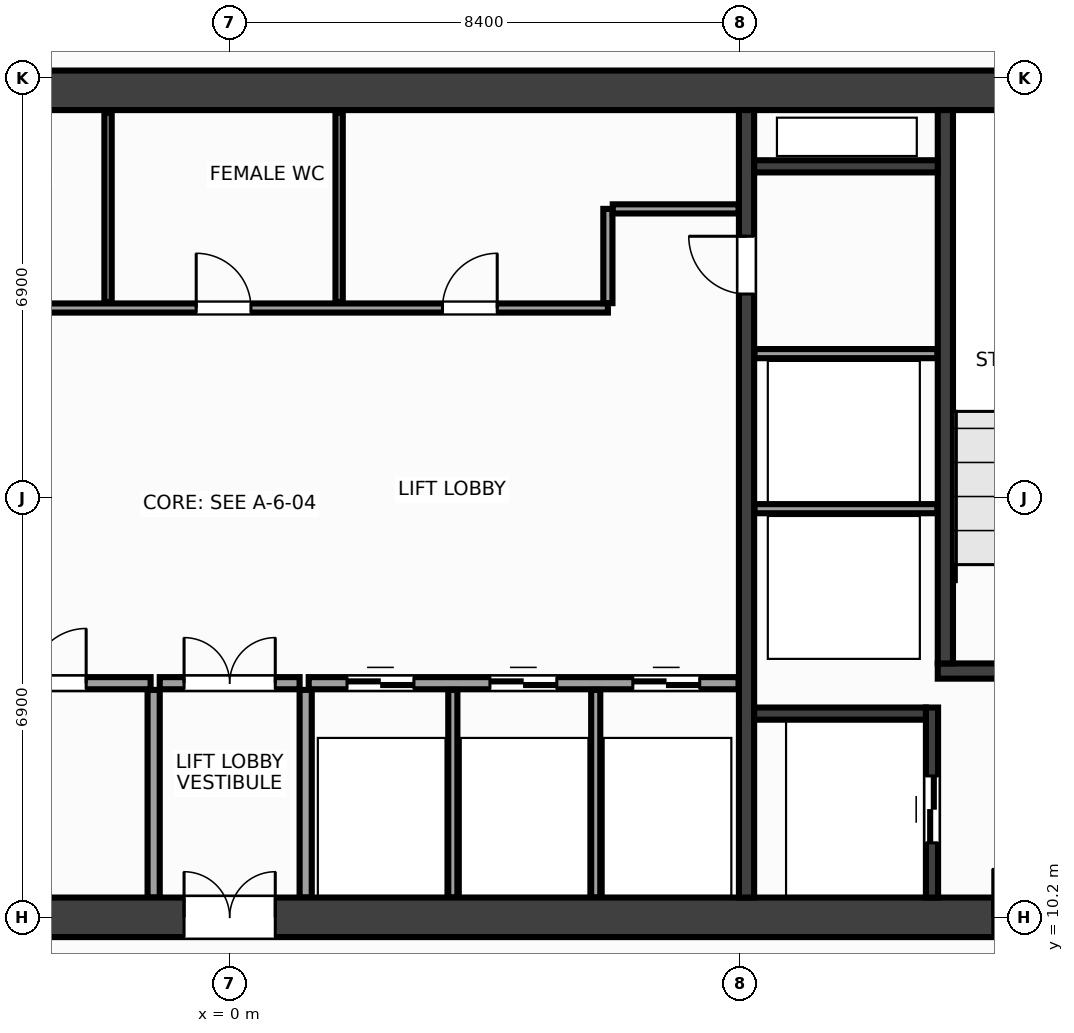
"""IFC4 building model, lengths in metres.
Left out: names, types, materials, properties, quantities, classifications, styles, units other than length and angle.
Written with IfcOpenShell. Run it as: python <this file> out.ifc"""

import sys

from ifc_helpers import new_model, si_unit, direction, frame, frame_2d, origin, place, context, subcontext, project, spatial, rectangle, extrude, source, transform, mapped, element, fill, save


model = new_model("IFC4")
c1 = context("Model", 3, precision=1e-05, world=origin(), true_north=direction((0.0, 1.0)))
c2 = subcontext(c1, "Body", "Model", "MODEL_VIEW")
j1 = project(units=[si_unit("LENGTHUNIT", "METRE"), si_unit("PLANEANGLEUNIT", "RADIAN")], contexts=[c1])
p1 = place(None, origin())
s1 = spatial("IfcSite", under=j1, at=p1, CompositionType="ELEMENT")
p2 = place(p1, origin())
s2 = spatial("IfcBuilding", under=s1, at=p2, CompositionType="ELEMENT")
p3 = place(p2, frame((0.0, 0.0, 117.2)))
s3 = spatial("IfcBuildingStorey", under=s2, at=p3, CompositionType="ELEMENT", Elevation=117.2)
m1 = source(origin(), c2, "Body", "SweptSolid", [
    extrude(rectangle(XDim=31.85, YDim=0.65, at=frame_2d((15.925, 0.0))), origin(), (0.0, 0.0, 1.0), 3.6),
])
p4 = place(p3, frame((-15.925, 23.8, 0.0), z_axis=(0.0, 0.0, 1.0), x_axis=(1.0, 0.0, 0.0)))
e1 = element("IfcWall", 1, at=p4, inside=s3, PredefinedType="SHEAR", context=c2, shape_type="MappedRepresentation", body=[
    mapped(m1, transform((0.0, 0.0, 0.0), x_axis=(1.0, 0.0, 0.0), y_axis=(0.0, 1.0, 0.0), z_axis=(0.0, 0.0, 1.0), scale=1.0)),
])
p5 = place(p3, frame((-15.925, 10.2, 0.0), z_axis=(0.0, 0.0, 1.0), x_axis=(1.0, 0.0, 0.0)))
e2 = element("IfcWall", 2, at=p5, inside=s3, PredefinedType="SHEAR", context=c2, shape_type="MappedRepresentation", body=[
    mapped(m1, transform((0.0, 0.0, 0.0), x_axis=(1.0, 0.0, 0.0), y_axis=(0.0, 1.0, 0.0), z_axis=(0.0, 0.0, 1.0), scale=1.0)),
])
p6 = place(p5, frame((1.775, 0.0, 0.0)))
e3 = element("IfcOpeningElement", 3, at=p6, cuts=e2, PredefinedType="OPENING", context=c2, shape_type="SweptSolid", body=[
    extrude(rectangle(XDim=1.6, YDim=2.15, at=frame_2d((0.8, 1.075))), frame((0.0, 0.337, 0.0), z_axis=(0.0, -1.0, 0.0), x_axis=(1.0, 0.0, 0.0)), (0.0, 0.0, 1.0), 0.674),
])
p7 = place(p5, frame((28.475, 0.0, 0.0)))
e4 = element("IfcOpeningElement", 4, at=p7, cuts=e2, PredefinedType="OPENING", context=c2, shape_type="SweptSolid", body=[
    extrude(rectangle(XDim=1.6, YDim=2.15, at=frame_2d((0.8, 1.075))), frame((0.0, 0.337, 0.0), z_axis=(0.0, -1.0, 0.0), x_axis=(1.0, 0.0, 0.0)), (0.0, 0.0, 1.0), 0.674),
])
p8 = place(p5, frame((15.175, 0.0, 0.0)))
e5 = element("IfcOpeningElement", 5, at=p8, cuts=e2, PredefinedType="OPENING", context=c2, shape_type="SweptSolid", body=[
    extrude(rectangle(XDim=1.5, YDim=2.2, at=frame_2d((0.75, 1.1))), frame((0.0, 0.337, 0.0), z_axis=(0.0, -1.0, 0.0), x_axis=(1.0, 0.0, 0.0)), (0.0, 0.0, 1.0), 0.674),
])
m2 = source(origin(), c2, "Body", "SweptSolid", [
    extrude(rectangle(XDim=12.95, YDim=0.25, at=frame_2d((6.475, 0.0))), origin(), (0.0, 0.0, 1.0), 3.6),
])
p9 = place(p3, frame((8.5, 10.525, 0.0), z_axis=(0.0, 0.0, 1.0), x_axis=(0.0, 1.0, 0.0)))
e6 = element("IfcWall", 6, at=p9, inside=s3, PredefinedType="SHEAR", context=c2, shape_type="MappedRepresentation", body=[
    mapped(m2, transform((0.0, 0.0, 0.0), x_axis=(1.0, 0.0, 0.0), y_axis=(0.0, 1.0, 0.0), z_axis=(0.0, 0.0, 1.0), scale=1.0)),
])
p10 = place(p9, frame((9.925, 0.0, 0.0)))
e7 = element("IfcOpeningElement", 7, at=p10, cuts=e6, PredefinedType="OPENING", context=c2, shape_type="SweptSolid", body=[
    extrude(rectangle(XDim=0.95, YDim=2.15, at=frame_2d((0.475, 1.075))), frame((0.0, 0.137, 0.0), z_axis=(0.0, -1.0, 0.0), x_axis=(1.0, 0.0, 0.0)), (0.0, 0.0, 1.0), 0.274),
])
m3 = source(origin(), c2, "Body", "SweptSolid", [
    extrude(rectangle(XDim=3.63, YDim=0.25, at=frame_2d((1.815, 0.0))), origin(), (0.0, 0.0, 1.0), 3.6),
])
p11 = place(p3, frame((11.645, 14.25, 0.0), z_axis=(0.0, 0.0, 1.0), x_axis=(1.0, 0.0, 0.0)))
e8 = element("IfcWall", 8, at=p11, inside=s3, PredefinedType="SHEAR", context=c2, shape_type="MappedRepresentation", body=[
    mapped(m3, transform((0.0, 0.0, 0.0), x_axis=(1.0, 0.0, 0.0), y_axis=(0.0, 1.0, 0.0), z_axis=(0.0, 0.0, 1.0), scale=1.0)),
])
p12 = place(p11, frame((0.95, 0.0, 0.0)))
e9 = element("IfcOpeningElement", 9, at=p12, cuts=e8, PredefinedType="OPENING", context=c2, shape_type="SweptSolid", body=[
    extrude(rectangle(XDim=1.6, YDim=2.15, at=frame_2d((0.8, 1.075))), frame((0.0, 0.137, 0.0), z_axis=(0.0, -1.0, 0.0), x_axis=(1.0, 0.0, 0.0)), (0.0, 0.0, 1.0), 0.274),
])
m4 = source(origin(), c2, "Body", "SweptSolid", [
    extrude(rectangle(XDim=9.1, YDim=0.25, at=frame_2d((4.55, 0.0))), origin(), (0.0, 0.0, 1.0), 3.6),
])
p13 = place(p3, frame((11.77, 14.375, 0.0), z_axis=(0.0, 0.0, 1.0), x_axis=(0.0, 1.0, 0.0)))
e10 = element("IfcWall", 10, at=p13, inside=s3, PredefinedType="SHEAR", context=c2, shape_type="MappedRepresentation", body=[
    mapped(m4, transform((0.0, 0.0, 0.0), x_axis=(1.0, 0.0, 0.0), y_axis=(0.0, 1.0, 0.0), z_axis=(0.0, 0.0, 1.0), scale=1.0)),
])
m5 = source(origin(), c2, "Body", "SweptSolid", [
    extrude(rectangle(XDim=3.125, YDim=0.2, at=frame_2d((1.562, 0.0))), origin(), (0.0, 0.0, 1.0), 3.6),
])
p14 = place(p3, frame((11.55, 10.525, 0.0), z_axis=(0.0, 0.0, 1.0), x_axis=(0.0, 1.0, 0.0)))
e11 = element("IfcWall", 11, at=p14, inside=s3, PredefinedType="SHEAR", context=c2, shape_type="MappedRepresentation", body=[
    mapped(m5, transform((0.0, 0.0, 0.0), x_axis=(1.0, 0.0, 0.0), y_axis=(0.0, 1.0, 0.0), z_axis=(0.0, 0.0, 1.0), scale=1.0)),
])
p15 = place(p14, frame((0.9, 0.0, 0.0)))
e12 = element("IfcOpeningElement", 12, at=p15, cuts=e11, PredefinedType="OPENING", context=c2, shape_type="SweptSolid", body=[
    extrude(rectangle(XDim=1.1, YDim=2.15, at=frame_2d((0.55, 1.075))), frame((0.0, 0.112, 0.0), z_axis=(0.0, -1.0, 0.0), x_axis=(1.0, 0.0, 0.0)), (0.0, 0.0, 1.0), 0.224),
])
m6 = source(origin(), c2, "Body", "SweptSolid", [
    extrude(rectangle(XDim=2.825, YDim=0.2, at=frame_2d((1.413, 0.0))), origin(), (0.0, 0.0, 1.0), 3.6),
])
p16 = place(p3, frame((8.625, 13.55, 0.0), z_axis=(0.0, 0.0, 1.0), x_axis=(1.0, 0.0, 0.0)))
e13 = element("IfcWall", 13, at=p16, inside=s3, PredefinedType="SHEAR", context=c2, shape_type="MappedRepresentation", body=[
    mapped(m6, transform((0.0, 0.0, 0.0), x_axis=(1.0, 0.0, 0.0), y_axis=(0.0, 1.0, 0.0), z_axis=(0.0, 0.0, 1.0), scale=1.0)),
])
m7 = source(origin(), c2, "Body", "SweptSolid", [
    extrude(rectangle(XDim=3.02, YDim=0.2, at=frame_2d((1.51, 0.0))), origin(), (0.0, 0.0, 1.0), 3.6),
])
p17 = place(p3, frame((8.625, 22.55, 0.0), z_axis=(0.0, 0.0, 1.0), x_axis=(1.0, 0.0, 0.0)))
e14 = element("IfcWall", 14, at=p17, inside=s3, PredefinedType="SHEAR", context=c2, shape_type="MappedRepresentation", body=[
    mapped(m7, transform((0.0, 0.0, 0.0), x_axis=(1.0, 0.0, 0.0), y_axis=(0.0, 1.0, 0.0), z_axis=(0.0, 0.0, 1.0), scale=1.0)),
])
m8 = source(origin(), c2, "Body", "SweptSolid", [
    extrude(rectangle(XDim=3.01, YDim=0.15, at=frame_2d((1.505, 0.0))), origin(), (0.0, 0.0, 1.0), 3.36),
])
for number, where, z_axis, x_axis in (
    (15, (8.63, 16.92, 0.0), (0.0, 0.0, 1.0), (1.0, 0.0, 0.0)),
    (16, (8.63, 19.47, 0.0), (0.0, 0.0, 1.0), (1.0, 0.0, 0.0)),
):
    element("IfcWall", number, at=place(p3, frame(where, z_axis=z_axis, x_axis=x_axis)), inside=s3, PredefinedType="PARTITIONING", context=c2, shape_type="MappedRepresentation", body=[
        mapped(m8, transform((0.0, 0.0, 0.0), x_axis=(1.0, 0.0, 0.0), y_axis=(0.0, 1.0, 0.0), z_axis=(0.0, 0.0, 1.0), scale=1.0)),
    ])
m9 = source(origin(), c2, "Body", "SweptSolid", [
    extrude(rectangle(XDim=7.07, YDim=0.2, at=frame_2d((3.535, 0.0))), origin(), (0.0, 0.0, 1.0), 3.36),
])
p18 = place(p3, frame((-8.37, 14.05, 0.0), z_axis=(0.0, 0.0, 1.0), x_axis=(1.0, 0.0, 0.0)))
e17 = element("IfcWall", 17, at=p18, inside=s3, PredefinedType="PARTITIONING", context=c2, shape_type="MappedRepresentation", body=[
    mapped(m9, transform((0.0, 0.0, 0.0), x_axis=(1.0, 0.0, 0.0), y_axis=(0.0, 1.0, 0.0), z_axis=(0.0, 0.0, 1.0), scale=1.0)),
])
p19 = place(p18, frame((1.66, 0.0, 0.0)))
e18 = element("IfcOpeningElement", 18, at=p19, cuts=e17, PredefinedType="OPENING", context=c2, shape_type="SweptSolid", body=[
    extrude(rectangle(XDim=0.9, YDim=2.15, at=frame_2d((0.45, 1.075))), frame((0.0, 0.112, 0.0), z_axis=(0.0, -1.0, 0.0), x_axis=(1.0, 0.0, 0.0)), (0.0, 0.0, 1.0), 0.224),
])
p20 = place(p18, frame((5.11, 0.0, 0.0)))
e19 = element("IfcOpeningElement", 19, at=p20, cuts=e17, PredefinedType="OPENING", context=c2, shape_type="SweptSolid", body=[
    extrude(rectangle(XDim=0.9, YDim=2.15, at=frame_2d((0.45, 1.075))), frame((0.0, 0.112, 0.0), z_axis=(0.0, -1.0, 0.0), x_axis=(1.0, 0.0, 0.0)), (0.0, 0.0, 1.0), 0.224),
])
p21 = place(p3, frame((1.3, 14.05, 0.0), z_axis=(0.0, 0.0, 1.0), x_axis=(1.0, 0.0, 0.0)))
e20 = element("IfcWall", 20, at=p21, inside=s3, PredefinedType="PARTITIONING", context=c2, shape_type="MappedRepresentation", body=[
    mapped(m9, transform((0.0, 0.0, 0.0), x_axis=(1.0, 0.0, 0.0), y_axis=(0.0, 1.0, 0.0), z_axis=(0.0, 0.0, 1.0), scale=1.0)),
])
p22 = place(p21, frame((0.63, 0.0, 0.0)))
e21 = element("IfcOpeningElement", 21, at=p22, cuts=e20, PredefinedType="OPENING", context=c2, shape_type="SweptSolid", body=[
    extrude(rectangle(XDim=1.1, YDim=2.15, at=frame_2d((0.55, 1.075))), frame((0.0, 0.112, 0.0), z_axis=(0.0, -1.0, 0.0), x_axis=(1.0, 0.0, 0.0)), (0.0, 0.0, 1.0), 0.224),
])
p23 = place(p21, frame((2.98, 0.0, 0.0)))
e22 = element("IfcOpeningElement", 22, at=p23, cuts=e20, PredefinedType="OPENING", context=c2, shape_type="SweptSolid", body=[
    extrude(rectangle(XDim=1.1, YDim=2.15, at=frame_2d((0.55, 1.075))), frame((0.0, 0.112, 0.0), z_axis=(0.0, -1.0, 0.0), x_axis=(1.0, 0.0, 0.0)), (0.0, 0.0, 1.0), 0.224),
])
p24 = place(p21, frame((5.33, 0.0, 0.0)))
e23 = element("IfcOpeningElement", 23, at=p24, cuts=e20, PredefinedType="OPENING", context=c2, shape_type="SweptSolid", body=[
    extrude(rectangle(XDim=1.1, YDim=2.15, at=frame_2d((0.55, 1.075))), frame((0.0, 0.112, 0.0), z_axis=(0.0, -1.0, 0.0), x_axis=(1.0, 0.0, 0.0)), (0.0, 0.0, 1.0), 0.224),
])
m10 = source(origin(), c2, "Body", "SweptSolid", [
    extrude(rectangle(XDim=3.415, YDim=0.2, at=frame_2d((1.708, 0.0))), origin(), (0.0, 0.0, 1.0), 3.36),
])
for number, where, z_axis, x_axis in (
    (24, (-1.25, 10.525, 0.0), (0.0, 0.0, 1.0), (0.0, 1.0, 0.0)),
    (25, (1.25, 10.525, 0.0), (0.0, 0.0, 1.0), (0.0, 1.0, 0.0)),
):
    element("IfcWall", number, at=place(p3, frame(where, z_axis=z_axis, x_axis=x_axis)), inside=s3, PredefinedType="PARTITIONING", context=c2, shape_type="MappedRepresentation", body=[
        mapped(m10, transform((0.0, 0.0, 0.0), x_axis=(1.0, 0.0, 0.0), y_axis=(0.0, 1.0, 0.0), z_axis=(0.0, 0.0, 1.0), scale=1.0)),
    ])
m11 = source(origin(), c2, "Body", "SweptSolid", [
    extrude(rectangle(XDim=2.3, YDim=0.2, at=frame_2d((1.15, 0.0))), origin(), (0.0, 0.0, 1.0), 3.36),
])
p25 = place(p3, frame((-1.15, 14.05, 0.0), z_axis=(0.0, 0.0, 1.0), x_axis=(1.0, 0.0, 0.0)))
e26 = element("IfcWall", 26, at=p25, inside=s3, PredefinedType="PARTITIONING", context=c2, shape_type="MappedRepresentation", body=[
    mapped(m11, transform((0.0, 0.0, 0.0), x_axis=(1.0, 0.0, 0.0), y_axis=(0.0, 1.0, 0.0), z_axis=(0.0, 0.0, 1.0), scale=1.0)),
])
p26 = place(p25, frame((0.4, 0.0, 0.0)))
e27 = element("IfcOpeningElement", 27, at=p26, cuts=e26, PredefinedType="OPENING", context=c2, shape_type="SweptSolid", body=[
    extrude(rectangle(XDim=1.5, YDim=2.2, at=frame_2d((0.75, 1.1))), frame((0.0, 0.112, 0.0), z_axis=(0.0, -1.0, 0.0), x_axis=(1.0, 0.0, 0.0)), (0.0, 0.0, 1.0), 0.224),
])
m12 = source(origin(), c2, "Body", "SweptSolid", [
    extrude(rectangle(XDim=14.59, YDim=0.15, at=frame_2d((7.295, 0.0))), origin(), (0.0, 0.0, 1.0), 3.36),
])
p27 = place(p3, frame((-8.37, 20.22, 0.0), z_axis=(0.0, 0.0, 1.0), x_axis=(1.0, 0.0, 0.0)))
e28 = element("IfcWall", 28, at=p27, inside=s3, PredefinedType="PARTITIONING", context=c2, shape_type="MappedRepresentation", body=[
    mapped(m12, transform((0.0, 0.0, 0.0), x_axis=(1.0, 0.0, 0.0), y_axis=(0.0, 1.0, 0.0), z_axis=(0.0, 0.0, 1.0), scale=1.0)),
])
p28 = place(p27, frame((1.06, 0.0, 0.0)))
e29 = element("IfcOpeningElement", 29, at=p28, cuts=e28, PredefinedType="OPENING", context=c2, shape_type="SweptSolid", body=[
    extrude(rectangle(XDim=0.9, YDim=2.15, at=frame_2d((0.45, 1.075))), frame((0.0, 0.087, 0.0), z_axis=(0.0, -1.0, 0.0), x_axis=(1.0, 0.0, 0.0)), (0.0, 0.0, 1.0), 0.174),
])
p29 = place(p27, frame((4.22, 0.0, 0.0)))
e30 = element("IfcOpeningElement", 30, at=p29, cuts=e28, PredefinedType="OPENING", context=c2, shape_type="SweptSolid", body=[
    extrude(rectangle(XDim=0.9, YDim=2.15, at=frame_2d((0.45, 1.075))), frame((0.0, 0.087, 0.0), z_axis=(0.0, -1.0, 0.0), x_axis=(1.0, 0.0, 0.0)), (0.0, 0.0, 1.0), 0.174),
])
p30 = place(p27, frame((7.82, 0.0, 0.0)))
e31 = element("IfcOpeningElement", 31, at=p30, cuts=e28, PredefinedType="OPENING", context=c2, shape_type="SweptSolid", body=[
    extrude(rectangle(XDim=0.9, YDim=2.15, at=frame_2d((0.45, 1.075))), frame((0.0, 0.087, 0.0), z_axis=(0.0, -1.0, 0.0), x_axis=(1.0, 0.0, 0.0)), (0.0, 0.0, 1.0), 0.174),
])
p31 = place(p27, frame((11.87, 0.0, 0.0)))
e32 = element("IfcOpeningElement", 32, at=p31, cuts=e28, PredefinedType="OPENING", context=c2, shape_type="SweptSolid", body=[
    extrude(rectangle(XDim=0.9, YDim=2.15, at=frame_2d((0.45, 1.075))), frame((0.0, 0.087, 0.0), z_axis=(0.0, -1.0, 0.0), x_axis=(1.0, 0.0, 0.0)), (0.0, 0.0, 1.0), 0.174),
])
m13 = source(origin(), c2, "Body", "SweptSolid", [
    extrude(rectangle(XDim=1.55, YDim=0.15, at=frame_2d((0.775, 0.0))), origin(), (0.0, 0.0, 1.0), 3.36),
])
p32 = place(p3, frame((6.22, 20.3, 0.0), z_axis=(0.0, 0.0, 1.0), x_axis=(0.0, 1.0, 0.0)))
e33 = element("IfcWall", 33, at=p32, inside=s3, PredefinedType="PARTITIONING", context=c2, shape_type="MappedRepresentation", body=[
    mapped(m13, transform((0.0, 0.0, 0.0), x_axis=(1.0, 0.0, 0.0), y_axis=(0.0, 1.0, 0.0), z_axis=(0.0, 0.0, 1.0), scale=1.0)),
])
m14 = source(origin(), c2, "Body", "SweptSolid", [
    extrude(rectangle(XDim=2.07, YDim=0.15, at=frame_2d((1.035, 0.0))), origin(), (0.0, 0.0, 1.0), 3.36),
])
p33 = place(p3, frame((6.3, 21.85, 0.0), z_axis=(0.0, 0.0, 1.0), x_axis=(1.0, 0.0, 0.0)))
e34 = element("IfcWall", 34, at=p33, inside=s3, PredefinedType="PARTITIONING", context=c2, shape_type="MappedRepresentation", body=[
    mapped(m14, transform((0.0, 0.0, 0.0), x_axis=(1.0, 0.0, 0.0), y_axis=(0.0, 1.0, 0.0), z_axis=(0.0, 0.0, 1.0), scale=1.0)),
])
m15 = source(origin(), c2, "Body", "SweptSolid", [
    extrude(rectangle(XDim=3.415, YDim=0.15, at=frame_2d((1.708, 0.0))), origin(), (0.0, 0.0, 1.0), 3.36),
])
for number, where, z_axis, x_axis in (
    (35, (3.67, 10.525, 0.0), (0.0, 0.0, 1.0), (0.0, 1.0, 0.0)),
    (36, (6.02, 10.525, 0.0), (0.0, 0.0, 1.0), (0.0, 1.0, 0.0)),
):
    element("IfcWall", number, at=place(p3, frame(where, z_axis=z_axis, x_axis=x_axis)), inside=s3, PredefinedType="PARTITIONING", context=c2, shape_type="MappedRepresentation", body=[
        mapped(m15, transform((0.0, 0.0, 0.0), x_axis=(1.0, 0.0, 0.0), y_axis=(0.0, 1.0, 0.0), z_axis=(0.0, 0.0, 1.0), scale=1.0)),
    ])
m16 = source(origin(), c2, "Body", "SweptSolid", [
    extrude(rectangle(XDim=3.115, YDim=0.12, at=frame_2d((1.558, 0.0))), origin(), (0.0, 0.0, 1.0), 3.36),
])
for number, where, z_axis, x_axis in (
    (37, (-2.0, 20.32, 0.0), (0.0, 0.0, 1.0), (0.0, 1.0, 0.0)),
    (38, (1.8, 20.32, 0.0), (0.0, 0.0, 1.0), (0.0, 1.0, 0.0)),
):
    element("IfcWall", number, at=place(p3, frame(where, z_axis=z_axis, x_axis=x_axis)), inside=s3, PredefinedType="PARTITIONING", context=c2, shape_type="MappedRepresentation", body=[
        mapped(m16, transform((0.0, 0.0, 0.0), x_axis=(1.0, 0.0, 0.0), y_axis=(0.0, 1.0, 0.0), z_axis=(0.0, 0.0, 1.0), scale=1.0)),
    ])
m17 = source(origin(), c2, "Body", "SweptSolid", [
    extrude(rectangle(XDim=1.6, YDim=2.15, at=frame_2d((0.8, 1.075))), frame((0.0, 0.025, 0.0), z_axis=(0.0, -1.0, 0.0), x_axis=(1.0, 0.0, 0.0)), (0.0, 0.0, 1.0), 0.05),
])
p34 = place(p7, origin())
e39 = element("IfcDoor", 39, at=p34, inside=s3, OperationType="DOUBLE_DOOR_SINGLE_SWING", PredefinedType="DOOR", context=c2, shape_type="MappedRepresentation", body=[
    mapped(m17, transform((0.0, 0.0, 0.0), x_axis=(1.0, 0.0, 0.0), y_axis=(0.0, 1.0, 0.0), z_axis=(0.0, 0.0, 1.0), scale=1.0)),
])
fill(e4, e39)
m18 = source(origin(), c2, "Body", "SweptSolid", [
    extrude(rectangle(XDim=1.1, YDim=2.15, at=frame_2d((0.55, 1.075))), frame((0.0, 0.025, 0.0), z_axis=(0.0, -1.0, 0.0), x_axis=(1.0, 0.0, 0.0)), (0.0, 0.0, 1.0), 0.05),
])
p35 = place(p15, origin())
e40 = element("IfcDoor", 40, at=p35, inside=s3, OperationType="DOUBLE_DOOR_SLIDING", PredefinedType="DOOR", context=c2, shape_type="MappedRepresentation", body=[
    mapped(m18, transform((0.0, 0.0, 0.0), x_axis=(1.0, 0.0, 0.0), y_axis=(0.0, 1.0, 0.0), z_axis=(0.0, 0.0, 1.0), scale=1.0)),
])
fill(e12, e40)
m19 = source(origin(), c2, "Body", "SweptSolid", [
    extrude(rectangle(XDim=0.95, YDim=2.15, at=frame_2d((0.475, 1.075))), frame((0.0, 0.025, 0.0), z_axis=(0.0, -1.0, 0.0), x_axis=(1.0, 0.0, 0.0)), (0.0, 0.0, 1.0), 0.05),
])
p36 = place(p10, origin())
e41 = element("IfcDoor", 41, at=p36, inside=s3, OperationType="SINGLE_SWING_RIGHT", PredefinedType="DOOR", context=c2, shape_type="MappedRepresentation", body=[
    mapped(m19, transform((0.0, 0.0, 0.0), x_axis=(1.0, 0.0, 0.0), y_axis=(0.0, 1.0, 0.0), z_axis=(0.0, 0.0, 1.0), scale=1.0)),
])
fill(e7, e41)
m20 = source(origin(), c2, "Body", "SweptSolid", [
    extrude(rectangle(XDim=0.9, YDim=2.15, at=frame_2d((0.45, 1.075))), frame((0.0, 0.025, 0.0), z_axis=(0.0, -1.0, 0.0), x_axis=(1.0, 0.0, 0.0)), (0.0, 0.0, 1.0), 0.05),
])
p37 = place(p20, origin())
e42 = element("IfcDoor", 42, at=p37, inside=s3, OperationType="SINGLE_SWING_RIGHT", PredefinedType="DOOR", context=c2, shape_type="MappedRepresentation", body=[
    mapped(m20, transform((0.0, 0.0, 0.0), x_axis=(1.0, 0.0, 0.0), y_axis=(0.0, 1.0, 0.0), z_axis=(0.0, 0.0, 1.0), scale=1.0)),
])
fill(e19, e42)
p38 = place(p22, origin())
e43 = element("IfcDoor", 43, at=p38, inside=s3, OperationType="DOUBLE_DOOR_SLIDING", PredefinedType="DOOR", context=c2, shape_type="MappedRepresentation", body=[
    mapped(m18, transform((0.0, 0.0, 0.0), x_axis=(1.0, 0.0, 0.0), y_axis=(0.0, 1.0, 0.0), z_axis=(0.0, 0.0, 1.0), scale=1.0)),
])
fill(e21, e43)
p39 = place(p23, origin())
e44 = element("IfcDoor", 44, at=p39, inside=s3, OperationType="DOUBLE_DOOR_SLIDING", PredefinedType="DOOR", context=c2, shape_type="MappedRepresentation", body=[
    mapped(m18, transform((0.0, 0.0, 0.0), x_axis=(1.0, 0.0, 0.0), y_axis=(0.0, 1.0, 0.0), z_axis=(0.0, 0.0, 1.0), scale=1.0)),
])
fill(e22, e44)
p40 = place(p24, origin())
e45 = element("IfcDoor", 45, at=p40, inside=s3, OperationType="DOUBLE_DOOR_SLIDING", PredefinedType="DOOR", context=c2, shape_type="MappedRepresentation", body=[
    mapped(m18, transform((0.0, 0.0, 0.0), x_axis=(1.0, 0.0, 0.0), y_axis=(0.0, 1.0, 0.0), z_axis=(0.0, 0.0, 1.0), scale=1.0)),
])
fill(e23, e45)
m21 = source(origin(), c2, "Body", "SweptSolid", [
    extrude(rectangle(XDim=1.5, YDim=2.2, at=frame_2d((0.75, 1.1))), frame((0.0, 0.025, 0.0), z_axis=(0.0, -1.0, 0.0), x_axis=(1.0, 0.0, 0.0)), (0.0, 0.0, 1.0), 0.05),
])
p41 = place(p26, origin())
e46 = element("IfcDoor", 46, at=p41, inside=s3, OperationType="DOUBLE_DOOR_SINGLE_SWING", PredefinedType="DOOR", context=c2, shape_type="MappedRepresentation", body=[
    mapped(m21, transform((0.0, 0.0, 0.0), x_axis=(1.0, 0.0, 0.0), y_axis=(0.0, 1.0, 0.0), z_axis=(0.0, 0.0, 1.0), scale=1.0)),
])
fill(e27, e46)
p42 = place(p8, origin())
e47 = element("IfcDoor", 47, at=p42, inside=s3, OperationType="DOUBLE_DOOR_SINGLE_SWING", PredefinedType="DOOR", context=c2, shape_type="MappedRepresentation", body=[
    mapped(m21, transform((0.0, 0.0, 0.0), x_axis=(1.0, 0.0, 0.0), y_axis=(0.0, 1.0, 0.0), z_axis=(0.0, 0.0, 1.0), scale=1.0)),
])
fill(e5, e47)
p43 = place(p30, origin())
e48 = element("IfcDoor", 48, at=p43, inside=s3, OperationType="SINGLE_SWING_LEFT", PredefinedType="DOOR", context=c2, shape_type="MappedRepresentation", body=[
    mapped(m20, transform((0.0, 0.0, 0.0), x_axis=(1.0, 0.0, 0.0), y_axis=(0.0, 1.0, 0.0), z_axis=(0.0, 0.0, 1.0), scale=1.0)),
])
fill(e31, e48)
p44 = place(p31, origin())
e49 = element("IfcDoor", 49, at=p44, inside=s3, OperationType="SINGLE_SWING_RIGHT", PredefinedType="DOOR", context=c2, shape_type="MappedRepresentation", body=[
    mapped(m20, transform((0.0, 0.0, 0.0), x_axis=(1.0, 0.0, 0.0), y_axis=(0.0, 1.0, 0.0), z_axis=(0.0, 0.0, 1.0), scale=1.0)),
])
fill(e32, e49)
save(model, sys.argv[1])
